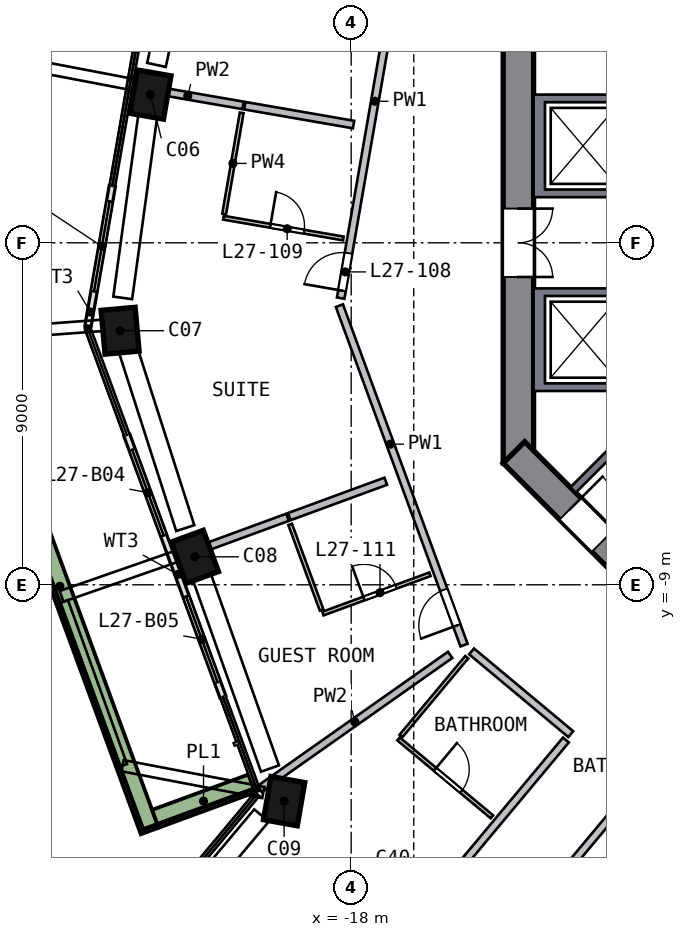
"""IFC4 building model, lengths in metres.
Left out: names, types, materials, properties, quantities, classifications, styles, units other than length and angle.
Written with IfcOpenShell. Run it as: python <this file> out.ifc"""

import sys

from ifc_helpers import new_model, si_unit, direction, frame, frame_2d, origin, origin_2d, place, context, subcontext, project, spatial, polyline, rectangle, outline, extrude, element, fill, save


model = new_model("IFC4")
c1 = context("Model", 3, precision=1e-05, world=origin(), true_north=direction((0.0, 1.0)))
c2 = subcontext(c1, "Body", "Model", "MODEL_VIEW")
j1 = project(units=[si_unit("LENGTHUNIT", "METRE"), si_unit("PLANEANGLEUNIT", "RADIAN")], contexts=[c1])
p1 = place(None, origin())
s1 = spatial("IfcSite", under=j1, at=p1, CompositionType="ELEMENT")
p2 = place(p1, origin())
s2 = spatial("IfcBuilding", under=s1, at=p2, CompositionType="ELEMENT")
p3 = place(p2, frame((0.0, 0.0, 115.0)))
s3 = spatial("IfcBuildingStorey", under=s2, at=p3, CompositionType="ELEMENT", Elevation=115.0)
p4 = place(p3, frame((-23.261, 4.035, 0.0), z_axis=(-0.018252096, -0.11080543, 0.993674503), x_axis=(-0.169817412, -0.979056669, -0.112294638)))
e1 = element("IfcColumn", 1, at=p4, inside=s3, PredefinedType="COLUMN", context=c2, shape_type="SweptSolid", body=[
    extrude(rectangle(XDim=1.15, YDim=0.9, at=origin_2d()), origin(), (0.0, 0.0, 1.0), 3.21),
])
p5 = place(p3, frame((-24.094, -2.176, 0.0), z_axis=(0.011251897, -0.114495653, 0.993360026), x_axis=(-0.088756673, 0.989387353, 0.115043115)))
e2 = element("IfcColumn", 2, at=p5, inside=s3, PredefinedType="COLUMN", context=c2, shape_type="SweptSolid", body=[
    extrude(rectangle(XDim=1.15, YDim=0.9, at=origin_2d()), origin(), (0.0, 0.0, 1.0), 3.211),
])
p6 = place(p3, frame((-22.162, -8.136, 0.0), z_axis=(0.039546221, -0.105101688, 0.993674862), x_axis=(0.342030908, -0.932955243, -0.11229146)))
e3 = element("IfcColumn", 3, at=p6, inside=s3, PredefinedType="COLUMN", context=c2, shape_type="SweptSolid", body=[
    extrude(rectangle(XDim=1.15, YDim=0.9, at=origin_2d()), origin(), (0.0, 0.0, 1.0), 3.21),
])
p7 = place(p3, frame((-19.849, -14.581, 0.0), z_axis=(0.070155123, -0.093793523, 0.993116828), x_axis=(0.176840134, 0.980970377, 0.080154141)))
e4 = element("IfcColumn", 4, at=p7, inside=s3, PredefinedType="COLUMN", context=c2, shape_type="SweptSolid", body=[
    extrude(rectangle(XDim=1.15, YDim=0.9, at=origin_2d()), origin(), (0.0, 0.0, 1.0), 3.212),
])
p8 = place(p3, frame((-13.6, 5.799, 0.0), z_axis=(0.0, 0.0, 1.0), x_axis=(0.0, -1.0, 0.0)))
e5 = element("IfcWall", 5, at=p8, inside=s3, PredefinedType="SHEAR", context=c2, shape_type="SweptSolid", body=[
    extrude(rectangle(XDim=11.598, YDim=0.8, at=frame_2d((5.799, 0.0))), origin(), (0.0, 0.0, 1.0), 3.5),
])
p9 = place(p8, frame((4.899, 0.0, 0.0)))
e6 = element("IfcOpeningElement", 6, at=p9, cuts=e5, PredefinedType="OPENING", context=c2, shape_type="SweptSolid", body=[
    extrude(rectangle(XDim=1.8, YDim=2.1, at=frame_2d((0.9, 1.05))), frame((0.0, 0.41, 0.0), z_axis=(0.0, -1.0, 0.0), x_axis=(1.0, 0.0, 0.0)), (0.0, 0.0, 1.0), 0.82),
])
p10 = place(p3, frame((-13.717, -5.516, 0.0), z_axis=(0.0, 0.0, 1.0), x_axis=(0.707106781, -0.707106781, 0.0)))
e7 = element("IfcWall", 7, at=p10, inside=s3, PredefinedType="SHEAR", context=c2, shape_type="SweptSolid", body=[
    extrude(rectangle(XDim=11.598, YDim=0.8, at=frame_2d((5.799, 0.0))), origin(), (0.0, 0.0, 1.0), 3.5),
])
p11 = place(p10, frame((2.099, 0.0, 0.0)))
e8 = element("IfcOpeningElement", 8, at=p11, cuts=e7, PredefinedType="OPENING", context=c2, shape_type="SweptSolid", body=[
    extrude(rectangle(XDim=1.2, YDim=2.1, at=frame_2d((0.6, 1.05))), frame((0.0, 0.41, 0.0), z_axis=(0.0, -1.0, 0.0), x_axis=(1.0, 0.0, 0.0)), (0.0, 0.0, 1.0), 0.82),
])
p12 = place(p3, frame((-24.287, 1.483, 0.0), z_axis=(0.0, 0.0, 1.0), x_axis=(-0.170957931, -0.985278329, 0.0)))
e9 = element("IfcWall", 9, at=p12, inside=s3, PredefinedType="SOLIDWALL", context=c2, shape_type="SweptSolid", body=[
    extrude(rectangle(XDim=3.71, YDim=0.15, at=frame_2d((1.855, 0.0))), origin(), (0.0, 0.0, 1.0), 2.425),
])
p13 = place(p12, frame((0.4, 0.0, 0.0)))
e10 = element("IfcOpeningElement", 10, at=p13, cuts=e9, PredefinedType="OPENING", context=c2, shape_type="SweptSolid", body=[
    extrude(rectangle(XDim=2.4, YDim=2.4, at=frame_2d((1.2, 1.2))), frame((0.0, 0.085, 0.0), z_axis=(0.0, -1.0, 0.0), x_axis=(1.0, 0.0, 0.0)), (0.0, 0.0, 1.0), 0.17),
])
p14 = place(p3, frame((-23.899, -5.073, 0.0), z_axis=(0.0, 0.0, 1.0), x_axis=(0.344663339, -0.938726362, 0.0)))
e11 = element("IfcWall", 11, at=p14, inside=s3, PredefinedType="SOLIDWALL", context=c2, shape_type="SweptSolid", body=[
    extrude(rectangle(XDim=3.475, YDim=0.15, at=frame_2d((1.738, 0.0))), origin(), (0.0, 0.0, 1.0), 2.425),
])
p15 = place(p14, frame((0.4, 0.0, 0.0)))
e12 = element("IfcOpeningElement", 12, at=p15, cuts=e11, PredefinedType="OPENING", context=c2, shape_type="SweptSolid", body=[
    extrude(rectangle(XDim=2.4, YDim=2.4, at=frame_2d((1.2, 1.2))), frame((0.0, 0.085, 0.0), z_axis=(0.0, -1.0, 0.0), x_axis=(1.0, 0.0, 0.0)), (0.0, 0.0, 1.0), 0.17),
])
p16 = place(p3, frame((-22.702, -8.335, 0.0), z_axis=(0.0, 0.0, 1.0), x_axis=(0.344634313, -0.938737019, 0.0)))
e13 = element("IfcWall", 13, at=p16, inside=s3, PredefinedType="SOLIDWALL", context=c2, shape_type="SweptSolid", body=[
    extrude(rectangle(XDim=3.835, YDim=0.15, at=frame_2d((1.917, 0.0))), origin(), (0.0, 0.0, 1.0), 2.425),
])
p17 = place(p16, frame((1.035, 0.0, 0.0)))
e14 = element("IfcOpeningElement", 14, at=p17, cuts=e13, PredefinedType="OPENING", context=c2, shape_type="SweptSolid", body=[
    extrude(rectangle(XDim=2.4, YDim=2.4, at=frame_2d((1.2, 1.2))), frame((0.0, 0.085, 0.0), z_axis=(0.0, -1.0, 0.0), x_axis=(1.0, 0.0, 0.0)), (0.0, 0.0, 1.0), 0.17),
])
p18 = place(p3, frame((-25.783, 10.562, 0.0), z_axis=(0.0, 0.0, 1.0), x_axis=(-0.170892357, -0.985289705, 0.0)))
e15 = element("IfcWall", 15, at=p18, inside=s3, PredefinedType="SOLIDWALL", context=c2, shape_type="SweptSolid", body=[
    extrude(rectangle(XDim=13.223, YDim=0.5, at=frame_2d((6.612, 0.0))), origin(), (0.0, 0.0, 1.0), 0.7),
])
p19 = place(p3, frame((-28.031, -2.596, 0.0), z_axis=(0.0, 0.0, 1.0), x_axis=(0.344642477, -0.938734022, 0.0)))
e16 = element("IfcWall", 16, at=p19, inside=s3, PredefinedType="SOLIDWALL", context=c2, shape_type="SweptSolid", body=[
    extrude(rectangle(XDim=13.724, YDim=0.5, at=frame_2d((6.862, 0.0))), origin(), (0.0, 0.0, 1.0), 0.7),
])
p20 = place(p3, frame((-23.153, -15.158, 0.0), z_axis=(0.0, 0.0, 1.0), x_axis=(0.93869784, 0.344741011, 0.0)))
e17 = element("IfcWall", 17, at=p20, inside=s3, PredefinedType="SOLIDWALL", context=c2, shape_type="SweptSolid", body=[
    extrude(rectangle(XDim=2.699, YDim=0.5, at=frame_2d((1.35, 0.0))), origin(), (0.0, 0.0, 1.0), 0.7),
])
p21 = place(p3, origin())
e18 = element("IfcWall", 18, at=p21, inside=s3, PredefinedType="SOLIDWALL", context=c2, shape_type="SweptSolid", body=[
    extrude(outline(polyline([(-13.2, 3.9), (-10.9, 3.9), (-10.9, 3.7), (-12.9, 3.7), (-12.9, 1.4), (-10.9, 1.4), (-10.9, 1.2), (-13.2, 1.2), (-13.2, 3.9)])), origin(), (0.0, 0.0, 1.0), 3.19),
])
p22 = place(p3, origin())
e19 = element("IfcWall", 19, at=p22, inside=s3, PredefinedType="SOLIDWALL", context=c2, shape_type="SweptSolid", body=[
    extrude(outline(polyline([(-13.2, -3.9), (-13.2, -1.2), (-10.9, -1.2), (-10.9, -1.4), (-12.9, -1.4), (-12.9, -3.7), (-10.9, -3.7), (-10.9, -3.9), (-13.2, -3.9)])), origin(), (0.0, 0.0, 1.0), 3.19),
])
p23 = place(p3, frame((-9.334, -3.677, 0.0), z_axis=(0.0, 0.0, 1.0), x_axis=(-0.707106781, -0.707106781, 0.0)))
e20 = element("IfcWall", 20, at=p23, inside=s3, PredefinedType="SOLIDWALL", context=c2, shape_type="SweptSolid", body=[
    extrude(rectangle(XDim=4.0, YDim=0.2, at=frame_2d((2.0, 0.0))), origin(), (0.0, 0.0, 1.0), 3.19),
])
p24 = place(p3, frame((-18.276, -1.456, 0.0), z_axis=(0.0, 0.0, 1.0), x_axis=(0.170875476, 0.985292633, 0.0)))
e21 = element("IfcWall", 21, at=p24, inside=s3, PredefinedType="SOLIDWALL", context=c2, shape_type="SweptSolid", body=[
    extrude(rectangle(XDim=9.115, YDim=0.2, at=frame_2d((4.558, 0.0))), origin(), (0.0, 0.0, 1.0), 3.19),
])
p25 = place(p24, frame((0.2, 0.0, 0.0)))
e22 = element("IfcOpeningElement", 22, at=p25, cuts=e21, PredefinedType="OPENING", context=c2, shape_type="SweptSolid", body=[
    extrude(rectangle(XDim=1.0, YDim=2.1, at=frame_2d((0.5, 1.05))), frame((0.0, 0.11, 0.0), z_axis=(0.0, -1.0, 0.0), x_axis=(1.0, 0.0, 0.0)), (0.0, 0.0, 1.0), 0.22),
])
p26 = place(p3, frame((-22.125, -24.801, 0.0), z_axis=(0.0, 0.0, 1.0), x_axis=(0.640651676, 0.767831642, 0.0)))
e23 = element("IfcWall", 23, at=p26, inside=s3, PredefinedType="SOLIDWALL", context=c2, shape_type="SweptSolid", body=[
    extrude(rectangle(XDim=15.259, YDim=0.2, at=frame_2d((7.63, 0.0))), origin(), (0.0, 0.0, 1.0), 3.19),
])
p27 = place(p26, frame((7.4, 0.0, 0.0)))
e24 = element("IfcOpeningElement", 24, at=p27, cuts=e23, PredefinedType="OPENING", context=c2, shape_type="SweptSolid", body=[
    extrude(rectangle(XDim=1.0, YDim=2.1, at=frame_2d((0.5, 1.05))), frame((0.0, 0.11, 0.0), z_axis=(0.0, -1.0, 0.0), x_axis=(1.0, 0.0, 0.0)), (0.0, 0.0, 1.0), 0.22),
])
p28 = place(p3, frame((-15.031, -10.587, 0.0), z_axis=(0.0, 0.0, 1.0), x_axis=(-0.34463154, 0.938738037, 0.0)))
e25 = element("IfcWall", 25, at=p28, inside=s3, PredefinedType="SOLIDWALL", context=c2, shape_type="SweptSolid", body=[
    extrude(rectangle(XDim=9.516, YDim=0.2, at=frame_2d((4.758, 0.0))), origin(), (0.0, 0.0, 1.0), 3.19),
])
p29 = place(p28, frame((0.55, 0.0, 0.0)))
e26 = element("IfcOpeningElement", 26, at=p29, cuts=e25, PredefinedType="OPENING", context=c2, shape_type="SweptSolid", body=[
    extrude(rectangle(XDim=1.0, YDim=2.1, at=frame_2d((0.5, 1.05))), frame((0.0, 0.11, 0.0), z_axis=(0.0, -1.0, 0.0), x_axis=(1.0, 0.0, 0.0)), (0.0, 0.0, 1.0), 0.22),
])
p30 = place(p3, frame((-10.66, -14.494, 0.0), z_axis=(0.0, 0.0, 1.0), x_axis=(-0.640642243, -0.767839512, 0.0)))
e27 = element("IfcWall", 27, at=p30, inside=s3, PredefinedType="SOLIDWALL", context=c2, shape_type="SweptSolid", body=[
    extrude(rectangle(XDim=15.259, YDim=0.2, at=frame_2d((7.629, 0.0))), origin(), (0.0, 0.0, 1.0), 3.19),
])
p31 = place(p30, frame((6.85, 0.0, 0.0)))
e28 = element("IfcOpeningElement", 28, at=p31, cuts=e27, PredefinedType="OPENING", context=c2, shape_type="SweptSolid", body=[
    extrude(rectangle(XDim=1.0, YDim=2.1, at=frame_2d((0.5, 1.05))), frame((0.0, 0.11, 0.0), z_axis=(0.0, -1.0, 0.0), x_axis=(1.0, 0.0, 0.0)), (0.0, 0.0, 1.0), 0.22),
])
p32 = place(p3, frame((-14.832, -10.753, 0.0), z_axis=(0.0, 0.0, 1.0), x_axis=(0.767826787, -0.640657495, 0.0)))
e29 = element("IfcWall", 29, at=p32, inside=s3, PredefinedType="SOLIDWALL", context=c2, shape_type="SweptSolid", body=[
    extrude(rectangle(XDim=3.4, YDim=0.2, at=frame_2d((1.7, 0.0))), origin(), (0.0, 0.0, 1.0), 3.19),
])
p33 = place(p3, frame((-20.845, 3.615, 0.0), z_axis=(0.0, 0.0, 1.0), x_axis=(-0.985279058, 0.170953732, 0.0)))
e30 = element("IfcWall", 30, at=p33, inside=s3, PredefinedType="SOLIDWALL", context=c2, shape_type="SweptSolid", body=[
    extrude(rectangle(XDim=2.952, YDim=0.2, at=frame_2d((1.476, 0.0))), origin(), (0.0, 0.0, 1.0), 3.19),
])
p34 = place(p3, frame((-19.672, -7.222, 0.0), z_axis=(0.0, 0.0, 1.0), x_axis=(-0.938751082, -0.344596004, 0.0)))
e31 = element("IfcWall", 31, at=p34, inside=s3, PredefinedType="SOLIDWALL", context=c2, shape_type="SweptSolid", body=[
    extrude(rectangle(XDim=3.152, YDim=0.2, at=frame_2d((1.576, 0.0))), origin(), (0.0, 0.0, 1.0), 3.19),
])
p35 = place(p3, frame((-17.938, 3.111, 0.0), z_axis=(0.0, 0.0, 1.0), x_axis=(-0.985293685, 0.170869407, 0.0)))
e32 = element("IfcWall", 32, at=p35, inside=s3, PredefinedType="SOLIDWALL", context=c2, shape_type="SweptSolid", body=[
    extrude(rectangle(XDim=2.905, YDim=0.2, at=frame_2d((1.452, 0.0))), origin(), (0.0, 0.0, 1.0), 3.19),
])
p36 = place(p3, frame((-17.09, -6.274, 0.0), z_axis=(0.0, 0.0, 1.0), x_axis=(-0.938740096, -0.344625931, 0.0)))
e33 = element("IfcWall", 33, at=p36, inside=s3, PredefinedType="SOLIDWALL", context=c2, shape_type="SweptSolid", body=[
    extrude(rectangle(XDim=2.705, YDim=0.2, at=frame_2d((1.353, 0.0))), origin(), (0.0, 0.0, 1.0), 3.19),
])
p37 = place(p3, frame((-15.396, -10.844, 0.0), z_axis=(0.0, 0.0, 1.0), x_axis=(-0.817522478, -0.575896691, 0.0)))
e34 = element("IfcWall", 34, at=p37, inside=s3, PredefinedType="SOLIDWALL", context=c2, shape_type="SweptSolid", body=[
    extrude(rectangle(XDim=6.132, YDim=0.2, at=frame_2d((3.066, 0.0))), origin(), (0.0, 0.0, 1.0), 3.19),
])
p38 = place(p3, frame((-21.343, 0.759, 0.0), z_axis=(0.0, 0.0, 1.0), x_axis=(0.170993898, 0.985272088, 0.0)))
e35 = element("IfcWall", 35, at=p38, inside=s3, PredefinedType="PARTITIONING", context=c2, shape_type="SweptSolid", body=[
    extrude(rectangle(XDim=2.7, YDim=0.1, at=frame_2d((1.35, 0.0))), origin(), (0.0, 0.0, 1.0), 3.19),
])
p39 = place(p3, frame((-21.36, 0.66, 0.0), z_axis=(0.0, 0.0, 1.0), x_axis=(0.985302885, -0.17081635, 0.0)))
e36 = element("IfcWall", 36, at=p39, inside=s3, PredefinedType="PARTITIONING", context=c2, shape_type="SweptSolid", body=[
    extrude(rectangle(XDim=3.2, YDim=0.1, at=frame_2d((1.6, 0.0))), origin(), (0.0, 0.0, 1.0), 3.19),
])
p40 = place(p39, frame((1.25, 0.0, 0.0)))
e37 = element("IfcOpeningElement", 37, at=p40, cuts=e36, PredefinedType="OPENING", context=c2, shape_type="SweptSolid", body=[
    extrude(rectangle(XDim=0.9, YDim=2.1, at=frame_2d((0.45, 1.05))), frame((0.0, 0.06, 0.0), z_axis=(0.0, -1.0, 0.0), x_axis=(1.0, 0.0, 0.0)), (0.0, 0.0, 1.0), 0.12),
])
p41 = place(p3, frame((-18.778, -9.664, 0.0), z_axis=(0.0, 0.0, 1.0), x_axis=(-0.34464917, 0.938731564, 0.0)))
e38 = element("IfcWall", 38, at=p41, inside=s3, PredefinedType="PARTITIONING", context=c2, shape_type="SweptSolid", body=[
    extrude(rectangle(XDim=2.4, YDim=0.1, at=frame_2d((1.2, 0.0))), origin(), (0.0, 0.0, 1.0), 3.19),
])
p42 = place(p3, frame((-18.744, -9.758, 0.0), z_axis=(0.0, 0.0, 1.0), x_axis=(0.93874123, 0.344622842, 0.0)))
e39 = element("IfcWall", 39, at=p42, inside=s3, PredefinedType="PARTITIONING", context=c2, shape_type="SweptSolid", body=[
    extrude(rectangle(XDim=3.0, YDim=0.1, at=frame_2d((1.5, 0.0))), origin(), (0.0, 0.0, 1.0), 3.19),
])
p43 = place(p42, frame((1.15, 0.0, 0.0)))
e40 = element("IfcOpeningElement", 40, at=p43, cuts=e39, PredefinedType="OPENING", context=c2, shape_type="SweptSolid", body=[
    extrude(rectangle(XDim=0.9, YDim=2.1, at=frame_2d((0.45, 1.05))), frame((0.0, 0.06, 0.0), z_axis=(0.0, -1.0, 0.0), x_axis=(1.0, 0.0, 0.0)), (0.0, 0.0, 1.0), 0.12),
])
p44 = place(p3, frame((-16.69, -12.979, 0.0), z_axis=(0.0, 0.0, 1.0), x_axis=(0.640673464, 0.767813462, 0.0)))
e41 = element("IfcWall", 41, at=p44, inside=s3, PredefinedType="PARTITIONING", context=c2, shape_type="SweptSolid", body=[
    extrude(rectangle(XDim=2.7, YDim=0.1, at=frame_2d((1.35, 0.0))), origin(), (0.0, 0.0, 1.0), 3.19),
])
p45 = place(p3, frame((-16.754, -13.056, 0.0), z_axis=(0.0, 0.0, 1.0), x_axis=(0.76783341, -0.640649557, 0.0)))
e42 = element("IfcWall", 42, at=p45, inside=s3, PredefinedType="PARTITIONING", context=c2, shape_type="SweptSolid", body=[
    extrude(rectangle(XDim=3.2, YDim=0.1, at=frame_2d((1.6, 0.0))), origin(), (0.0, 0.0, 1.0), 3.19),
])
p46 = place(p45, frame((1.25, 0.0, 0.0)))
e43 = element("IfcOpeningElement", 43, at=p46, cuts=e42, PredefinedType="OPENING", context=c2, shape_type="SweptSolid", body=[
    extrude(rectangle(XDim=0.9, YDim=2.1, at=frame_2d((0.45, 1.05))), frame((0.0, 0.06, 0.0), z_axis=(0.0, -1.0, 0.0), x_axis=(1.0, 0.0, 0.0)), (0.0, 0.0, 1.0), 0.12),
])
p47 = place(p13, origin())
e44 = element("IfcDoor", 44, at=p47, inside=s3, OperationType="SLIDING_TO_RIGHT", PredefinedType="DOOR", context=c2, shape_type="SweptSolid", body=[
    extrude(rectangle(XDim=2.4, YDim=2.4, at=frame_2d((1.2, 1.2))), frame((0.0, 0.025, 0.0), z_axis=(0.0, -1.0, 0.0), x_axis=(1.0, 0.0, 0.0)), (0.0, 0.0, 1.0), 0.05),
])
fill(e10, e44)
p48 = place(p15, origin())
e45 = element("IfcDoor", 45, at=p48, inside=s3, OperationType="SLIDING_TO_RIGHT", PredefinedType="DOOR", context=c2, shape_type="SweptSolid", body=[
    extrude(rectangle(XDim=2.4, YDim=2.4, at=frame_2d((1.2, 1.2))), frame((0.0, 0.025, 0.0), z_axis=(0.0, -1.0, 0.0), x_axis=(1.0, 0.0, 0.0)), (0.0, 0.0, 1.0), 0.05),
])
fill(e12, e45)
p49 = place(p17, origin())
e46 = element("IfcDoor", 46, at=p49, inside=s3, OperationType="SLIDING_TO_LEFT", PredefinedType="DOOR", context=c2, shape_type="SweptSolid", body=[
    extrude(rectangle(XDim=2.4, YDim=2.4, at=frame_2d((1.2, 1.2))), frame((0.0, 0.025, 0.0), z_axis=(0.0, -1.0, 0.0), x_axis=(1.0, 0.0, 0.0)), (0.0, 0.0, 1.0), 0.05),
])
fill(e14, e46)
p50 = place(p9, origin())
e47 = element("IfcDoor", 47, at=p50, inside=s3, OperationType="DOUBLE_DOOR_SINGLE_SWING", PredefinedType="DOOR", context=c2, shape_type="SweptSolid", body=[
    extrude(rectangle(XDim=1.8, YDim=2.1, at=frame_2d((0.9, 1.05))), frame((0.0, 0.025, 0.0), z_axis=(0.0, -1.0, 0.0), x_axis=(1.0, 0.0, 0.0)), (0.0, 0.0, 1.0), 0.05),
])
fill(e6, e47)
p51 = place(p11, origin())
e48 = element("IfcDoor", 48, at=p51, inside=s3, OperationType="SINGLE_SWING_LEFT", PredefinedType="DOOR", context=c2, shape_type="SweptSolid", body=[
    extrude(rectangle(XDim=1.2, YDim=2.1, at=frame_2d((0.6, 1.05))), frame((0.0, 0.025, 0.0), z_axis=(0.0, -1.0, 0.0), x_axis=(1.0, 0.0, 0.0)), (0.0, 0.0, 1.0), 0.05),
])
fill(e8, e48)
p52 = place(p25, origin())
e49 = element("IfcDoor", 49, at=p52, inside=s3, OperationType="SINGLE_SWING_LEFT", PredefinedType="DOOR", context=c2, shape_type="SweptSolid", body=[
    extrude(rectangle(XDim=1.0, YDim=2.1, at=frame_2d((0.5, 1.05))), frame((0.0, 0.025, 0.0), z_axis=(0.0, -1.0, 0.0), x_axis=(1.0, 0.0, 0.0)), (0.0, 0.0, 1.0), 0.05),
])
fill(e22, e49)
p53 = place(p40, origin())
e50 = element("IfcDoor", 50, at=p53, inside=s3, OperationType="SINGLE_SWING_LEFT", PredefinedType="DOOR", context=c2, shape_type="SweptSolid", body=[
    extrude(rectangle(XDim=0.9, YDim=2.1, at=frame_2d((0.45, 1.05))), frame((0.0, 0.025, 0.0), z_axis=(0.0, -1.0, 0.0), x_axis=(1.0, 0.0, 0.0)), (0.0, 0.0, 1.0), 0.05),
])
fill(e37, e50)
p54 = place(p29, origin())
e51 = element("IfcDoor", 51, at=p54, inside=s3, OperationType="SINGLE_SWING_LEFT", PredefinedType="DOOR", context=c2, shape_type="SweptSolid", body=[
    extrude(rectangle(XDim=1.0, YDim=2.1, at=frame_2d((0.5, 1.05))), frame((0.0, 0.025, 0.0), z_axis=(0.0, -1.0, 0.0), x_axis=(1.0, 0.0, 0.0)), (0.0, 0.0, 1.0), 0.05),
])
fill(e26, e51)
p55 = place(p43, origin())
e52 = element("IfcDoor", 52, at=p55, inside=s3, OperationType="SINGLE_SWING_LEFT", PredefinedType="DOOR", context=c2, shape_type="SweptSolid", body=[
    extrude(rectangle(XDim=0.9, YDim=2.1, at=frame_2d((0.45, 1.05))), frame((0.0, 0.025, 0.0), z_axis=(0.0, -1.0, 0.0), x_axis=(1.0, 0.0, 0.0)), (0.0, 0.0, 1.0), 0.05),
])
fill(e40, e52)
p56 = place(p46, origin())
e53 = element("IfcDoor", 53, at=p56, inside=s3, OperationType="SINGLE_SWING_LEFT", PredefinedType="DOOR", context=c2, shape_type="SweptSolid", body=[
    extrude(rectangle(XDim=0.9, YDim=2.1, at=frame_2d((0.45, 1.05))), frame((0.0, 0.025, 0.0), z_axis=(0.0, -1.0, 0.0), x_axis=(1.0, 0.0, 0.0)), (0.0, 0.0, 1.0), 0.05),
])
fill(e43, e53)
save(model, sys.argv[1])
